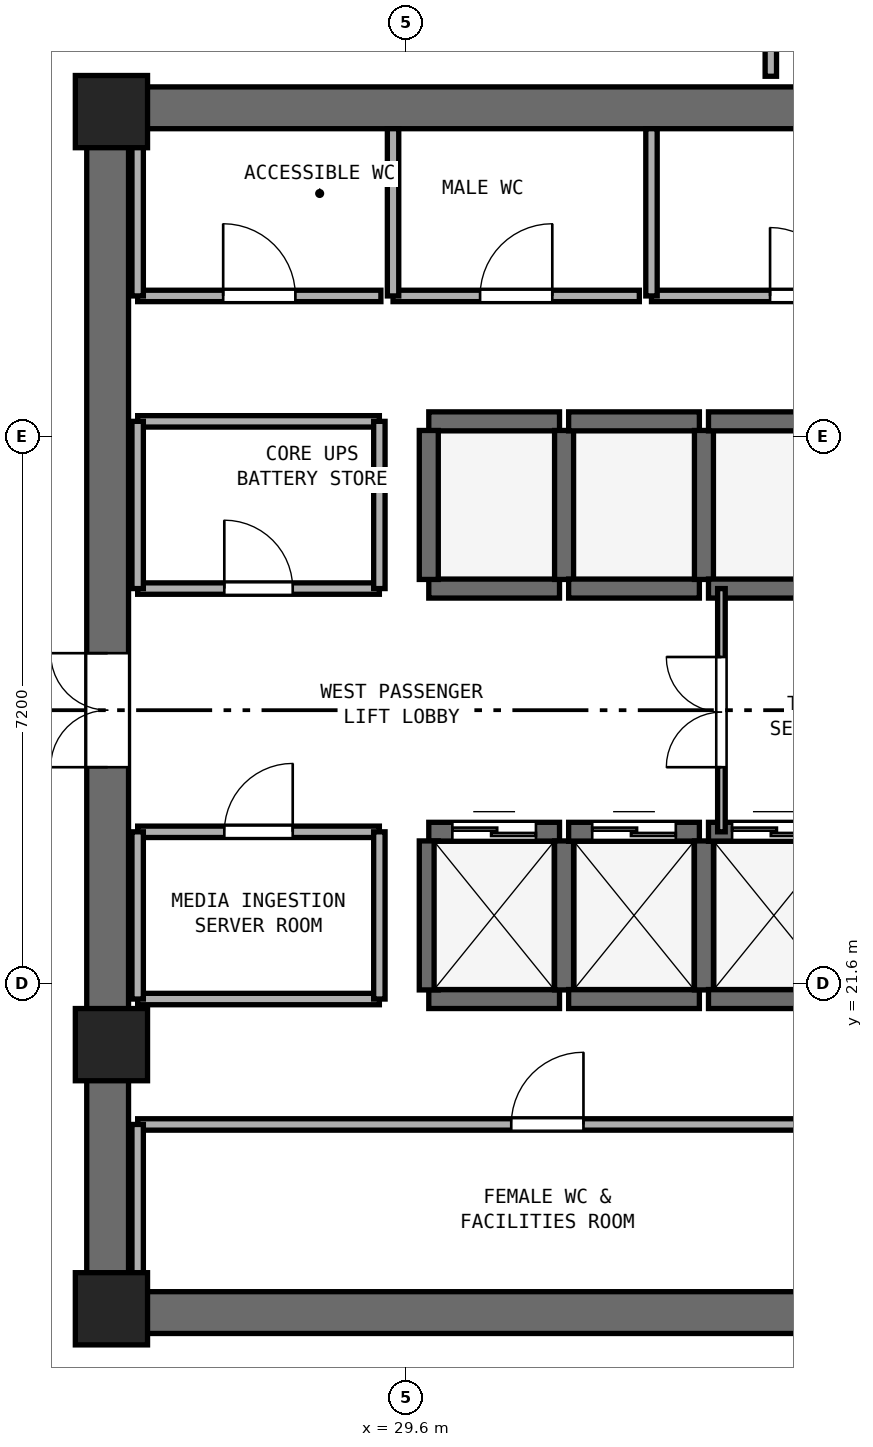
"""IFC4 building model, lengths in metres.
Left out: names, types, materials, properties, quantities, classifications, styles, units other than length and angle.
Written with IfcOpenShell. Run it as: python <this file> out.ifc"""

import sys

from ifc_helpers import new_model, si_unit, direction, frame, frame_2d, origin, origin_2d, place, context, subcontext, project, spatial, rectangle, extrude, element, fill, save


model = new_model("IFC4")
c1 = context("Model", 3, precision=1e-05, world=origin(), true_north=direction((0.0, 1.0)))
c2 = subcontext(c1, "Body", "Model", "MODEL_VIEW")
j1 = project(units=[si_unit("LENGTHUNIT", "METRE"), si_unit("PLANEANGLEUNIT", "RADIAN")], contexts=[c1])
p1 = place(None, origin())
s1 = spatial("IfcSite", under=j1, at=p1, CompositionType="ELEMENT")
p2 = place(p1, origin())
s2 = spatial("IfcBuilding", under=s1, at=p2, CompositionType="ELEMENT")
p3 = place(p2, frame((0.0, 0.0, 174.4)))
s3 = spatial("IfcBuildingStorey", under=s2, at=p3, CompositionType="ELEMENT", Elevation=174.4)
for number, where, z_axis, x_axis in (
    (1, (25.4, 17.275, 0.0), (0.0, 0.0, 1.0), (1.0, 0.0, 0.0)),
    (2, (25.4, 33.125, 0.0), (0.0, 0.0, 1.0), (1.0, 0.0, 0.0)),
):
    element("IfcWall", number, at=place(p3, frame(where, z_axis=z_axis, x_axis=x_axis)), inside=s3, PredefinedType="SHEAR", context=c2, shape_type="SweptSolid", body=[
        extrude(rectangle(XDim=23.2, YDim=0.55, at=frame_2d((11.6, 0.0))), origin(), (0.0, 0.0, 1.0), 3.54),
    ])
p4 = place(p3, frame((25.675, 17.55, 0.0), z_axis=(0.0, 0.0, 1.0), x_axis=(0.0, 1.0, 0.0)))
e3 = element("IfcWall", 3, at=p4, inside=s3, PredefinedType="SHEAR", context=c2, shape_type="SweptSolid", body=[
    extrude(rectangle(XDim=15.3, YDim=0.55, at=frame_2d((7.65, 0.0))), origin(), (0.0, 0.0, 1.0), 3.54),
])
p5 = place(p4, frame((6.9, 0.0, 0.0)))
e4 = element("IfcOpeningElement", 4, at=p5, cuts=e3, PredefinedType="OPENING", context=c2, shape_type="SweptSolid", body=[
    extrude(rectangle(XDim=1.5, YDim=2.15, at=frame_2d((0.75, 1.075))), frame((0.0, 0.285, 0.0), z_axis=(0.0, -1.0, 0.0), x_axis=(1.0, 0.0, 0.0)), (0.0, 0.0, 1.0), 0.57),
])
for number, where, z_axis, x_axis in (
    (5, (25.725, 17.325, 0.0), (0.0, 0.0, 1.0), (1.0, 0.0, 0.0)),
    (6, (25.725, 33.075, 0.0), (0.0, 0.0, 1.0), (1.0, 0.0, 0.0)),
    (7, (25.725, 20.8, 0.0), (0.0, 0.0, 1.0), (1.0, 0.0, 0.0)),
):
    element("IfcColumn", number, at=place(p3, frame(where, z_axis=z_axis, x_axis=x_axis)), inside=s3, PredefinedType="PILASTER", context=c2, shape_type="SweptSolid", body=[
        extrude(rectangle(XDim=0.95, YDim=0.95, at=origin_2d()), origin(), (0.0, 0.0, 1.0), 3.8),
    ])
p6 = place(p3, frame((29.9, 21.4, 0.0), z_axis=(0.0, 0.0, 1.0), x_axis=(1.0, 0.0, 0.0)))
e8 = element("IfcWall", 8, at=p6, inside=s3, PredefinedType="SHEAR", context=c2, shape_type="SweptSolid", body=[
    extrude(rectangle(XDim=1.72, YDim=0.25, at=frame_2d((0.86, 0.0))), origin(), (0.0, 0.0, 1.0), 3.54),
])
p7 = place(p3, frame((29.9, 23.6, 0.0), z_axis=(0.0, 0.0, 1.0), x_axis=(1.0, 0.0, 0.0)))
e9 = element("IfcWall", 9, at=p7, inside=s3, PredefinedType="SHEAR", context=c2, shape_type="SweptSolid", body=[
    extrude(rectangle(XDim=1.72, YDim=0.25, at=frame_2d((0.86, 0.0))), origin(), (0.0, 0.0, 1.0), 3.54),
])
p8 = place(p7, frame((0.31, 0.0, 0.0)))
e10 = element("IfcOpeningElement", 10, at=p8, cuts=e9, PredefinedType="OPENING", context=c2, shape_type="SweptSolid", body=[
    extrude(rectangle(XDim=1.1, YDim=2.15, at=frame_2d((0.55, 1.075))), frame((0.0, 0.135, 0.0), z_axis=(0.0, -1.0, 0.0), x_axis=(1.0, 0.0, 0.0)), (0.0, 0.0, 1.0), 0.27),
])
for number, where, z_axis, x_axis in (
    (11, (29.9, 21.52, 0.0), (0.0, 0.0, 1.0), (0.0, 1.0, 0.0)),
    (12, (31.68, 21.52, 0.0), (0.0, 0.0, 1.0), (0.0, 1.0, 0.0)),
):
    element("IfcWall", number, at=place(p3, frame(where, z_axis=z_axis, x_axis=x_axis)), inside=s3, PredefinedType="SHEAR", context=c2, shape_type="SweptSolid", body=[
        extrude(rectangle(XDim=1.96, YDim=0.25, at=frame_2d((0.98, 0.0))), origin(), (0.0, 0.0, 1.0), 3.54),
    ])
p9 = place(p3, frame((31.74, 21.4, 0.0), z_axis=(0.0, 0.0, 1.0), x_axis=(1.0, 0.0, 0.0)))
e13 = element("IfcWall", 13, at=p9, inside=s3, PredefinedType="SHEAR", context=c2, shape_type="SweptSolid", body=[
    extrude(rectangle(XDim=1.72, YDim=0.25, at=frame_2d((0.86, 0.0))), origin(), (0.0, 0.0, 1.0), 3.54),
])
p10 = place(p3, frame((31.74, 23.6, 0.0), z_axis=(0.0, 0.0, 1.0), x_axis=(1.0, 0.0, 0.0)))
e14 = element("IfcWall", 14, at=p10, inside=s3, PredefinedType="SHEAR", context=c2, shape_type="SweptSolid", body=[
    extrude(rectangle(XDim=1.72, YDim=0.25, at=frame_2d((0.86, 0.0))), origin(), (0.0, 0.0, 1.0), 3.54),
])
p11 = place(p10, frame((0.31, 0.0, 0.0)))
e15 = element("IfcOpeningElement", 15, at=p11, cuts=e14, PredefinedType="OPENING", context=c2, shape_type="SweptSolid", body=[
    extrude(rectangle(XDim=1.1, YDim=2.15, at=frame_2d((0.55, 1.075))), frame((0.0, 0.135, 0.0), z_axis=(0.0, -1.0, 0.0), x_axis=(1.0, 0.0, 0.0)), (0.0, 0.0, 1.0), 0.27),
])
p12 = place(p3, frame((33.52, 21.52, 0.0), z_axis=(0.0, 0.0, 1.0), x_axis=(0.0, 1.0, 0.0)))
e16 = element("IfcWall", 16, at=p12, inside=s3, PredefinedType="SHEAR", context=c2, shape_type="SweptSolid", body=[
    extrude(rectangle(XDim=1.96, YDim=0.25, at=frame_2d((0.98, 0.0))), origin(), (0.0, 0.0, 1.0), 3.54),
])
p13 = place(p3, frame((33.58, 21.4, 0.0), z_axis=(0.0, 0.0, 1.0), x_axis=(1.0, 0.0, 0.0)))
e17 = element("IfcWall", 17, at=p13, inside=s3, PredefinedType="SHEAR", context=c2, shape_type="SweptSolid", body=[
    extrude(rectangle(XDim=1.72, YDim=0.25, at=frame_2d((0.86, 0.0))), origin(), (0.0, 0.0, 1.0), 3.54),
])
p14 = place(p3, frame((33.58, 23.6, 0.0), z_axis=(0.0, 0.0, 1.0), x_axis=(1.0, 0.0, 0.0)))
e18 = element("IfcWall", 18, at=p14, inside=s3, PredefinedType="SHEAR", context=c2, shape_type="SweptSolid", body=[
    extrude(rectangle(XDim=1.72, YDim=0.25, at=frame_2d((0.86, 0.0))), origin(), (0.0, 0.0, 1.0), 3.54),
])
p15 = place(p14, frame((0.31, 0.0, 0.0)))
e19 = element("IfcOpeningElement", 19, at=p15, cuts=e18, PredefinedType="OPENING", context=c2, shape_type="SweptSolid", body=[
    extrude(rectangle(XDim=1.1, YDim=2.15, at=frame_2d((0.55, 1.075))), frame((0.0, 0.135, 0.0), z_axis=(0.0, -1.0, 0.0), x_axis=(1.0, 0.0, 0.0)), (0.0, 0.0, 1.0), 0.27),
])
for number, where, z_axis, x_axis in (
    (20, (29.9, 26.8, 0.0), (0.0, 0.0, 1.0), (1.0, 0.0, 0.0)),
    (21, (29.9, 29.0, 0.0), (0.0, 0.0, 1.0), (1.0, 0.0, 0.0)),
):
    element("IfcWall", number, at=place(p3, frame(where, z_axis=z_axis, x_axis=x_axis)), inside=s3, PredefinedType="SHEAR", context=c2, shape_type="SweptSolid", body=[
        extrude(rectangle(XDim=1.72, YDim=0.25, at=frame_2d((0.86, 0.0))), origin(), (0.0, 0.0, 1.0), 3.54),
    ])
for number, where, z_axis, x_axis in (
    (22, (29.9, 26.92, 0.0), (0.0, 0.0, 1.0), (0.0, 1.0, 0.0)),
    (23, (31.68, 26.92, 0.0), (0.0, 0.0, 1.0), (0.0, 1.0, 0.0)),
):
    element("IfcWall", number, at=place(p3, frame(where, z_axis=z_axis, x_axis=x_axis)), inside=s3, PredefinedType="SHEAR", context=c2, shape_type="SweptSolid", body=[
        extrude(rectangle(XDim=1.96, YDim=0.25, at=frame_2d((0.98, 0.0))), origin(), (0.0, 0.0, 1.0), 3.54),
    ])
for number, where, z_axis, x_axis in (
    (24, (31.74, 26.8, 0.0), (0.0, 0.0, 1.0), (1.0, 0.0, 0.0)),
    (25, (31.74, 29.0, 0.0), (0.0, 0.0, 1.0), (1.0, 0.0, 0.0)),
):
    element("IfcWall", number, at=place(p3, frame(where, z_axis=z_axis, x_axis=x_axis)), inside=s3, PredefinedType="SHEAR", context=c2, shape_type="SweptSolid", body=[
        extrude(rectangle(XDim=1.72, YDim=0.25, at=frame_2d((0.86, 0.0))), origin(), (0.0, 0.0, 1.0), 3.54),
    ])
p16 = place(p3, frame((33.52, 26.92, 0.0), z_axis=(0.0, 0.0, 1.0), x_axis=(0.0, 1.0, 0.0)))
e26 = element("IfcWall", 26, at=p16, inside=s3, PredefinedType="SHEAR", context=c2, shape_type="SweptSolid", body=[
    extrude(rectangle(XDim=1.96, YDim=0.25, at=frame_2d((0.98, 0.0))), origin(), (0.0, 0.0, 1.0), 3.54),
])
for number, where, z_axis, x_axis in (
    (27, (33.58, 26.8, 0.0), (0.0, 0.0, 1.0), (1.0, 0.0, 0.0)),
    (28, (33.58, 29.0, 0.0), (0.0, 0.0, 1.0), (1.0, 0.0, 0.0)),
):
    element("IfcWall", number, at=place(p3, frame(where, z_axis=z_axis, x_axis=x_axis)), inside=s3, PredefinedType="SHEAR", context=c2, shape_type="SweptSolid", body=[
        extrude(rectangle(XDim=1.72, YDim=0.25, at=frame_2d((0.86, 0.0))), origin(), (0.0, 0.0, 1.0), 3.54),
    ])
p17 = place(p3, frame((26.07, 30.65, 0.0), z_axis=(0.0, 0.0, 1.0), x_axis=(1.0, 0.0, 0.0)))
e29 = element("IfcWall", 29, at=p17, inside=s3, PredefinedType="PARTITIONING", context=c2, shape_type="SweptSolid", body=[
    extrude(rectangle(XDim=3.2, YDim=0.15, at=frame_2d((1.6, 0.0))), origin(), (0.0, 0.0, 1.0), 3.54),
])
p18 = place(p17, frame((1.125, 0.0, 0.0)))
e30 = element("IfcOpeningElement", 30, at=p18, cuts=e29, PredefinedType="OPENING", context=c2, shape_type="SweptSolid", body=[
    extrude(rectangle(XDim=0.95, YDim=2.1, at=frame_2d((0.475, 1.05))), frame((0.0, 0.085, 0.0), z_axis=(0.0, -1.0, 0.0), x_axis=(1.0, 0.0, 0.0)), (0.0, 0.0, 1.0), 0.17),
])
p19 = place(p3, frame((26.07, 30.65, 0.0), z_axis=(0.0, 0.0, 1.0), x_axis=(0.0, 1.0, 0.0)))
e31 = element("IfcWall", 31, at=p19, inside=s3, PredefinedType="PARTITIONING", context=c2, shape_type="SweptSolid", body=[
    extrude(rectangle(XDim=2.2, YDim=0.15, at=frame_2d((1.1, 0.0))), origin(), (0.0, 0.0, 1.0), 2.64),
])
p20 = place(p3, frame((29.43, 30.65, 0.0), z_axis=(0.0, 0.0, 1.0), x_axis=(1.0, 0.0, 0.0)))
e32 = element("IfcWall", 32, at=p20, inside=s3, PredefinedType="PARTITIONING", context=c2, shape_type="SweptSolid", body=[
    extrude(rectangle(XDim=3.24, YDim=0.15, at=frame_2d((1.62, 0.0))), origin(), (0.0, 0.0, 1.0), 3.54),
])
p21 = place(p20, frame((1.145, 0.0, 0.0)))
e33 = element("IfcOpeningElement", 33, at=p21, cuts=e32, PredefinedType="OPENING", context=c2, shape_type="SweptSolid", body=[
    extrude(rectangle(XDim=0.95, YDim=2.1, at=frame_2d((0.475, 1.05))), frame((0.0, 0.085, 0.0), z_axis=(0.0, -1.0, 0.0), x_axis=(1.0, 0.0, 0.0)), (0.0, 0.0, 1.0), 0.17),
])
p22 = place(p3, frame((29.43, 30.65, 0.0), z_axis=(0.0, 0.0, 1.0), x_axis=(0.0, 1.0, 0.0)))
e34 = element("IfcWall", 34, at=p22, inside=s3, PredefinedType="PARTITIONING", context=c2, shape_type="SweptSolid", body=[
    extrude(rectangle(XDim=2.2, YDim=0.15, at=frame_2d((1.1, 0.0))), origin(), (0.0, 0.0, 1.0), 3.54),
])
p23 = place(p3, frame((32.83, 30.65, 0.0), z_axis=(0.0, 0.0, 1.0), x_axis=(1.0, 0.0, 0.0)))
e35 = element("IfcWall", 35, at=p23, inside=s3, PredefinedType="PARTITIONING", context=c2, shape_type="SweptSolid", body=[
    extrude(rectangle(XDim=4.02, YDim=0.15, at=frame_2d((2.01, 0.0))), origin(), (0.0, 0.0, 1.0), 3.54),
])
p24 = place(p23, frame((1.56, 0.0, 0.0)))
e36 = element("IfcOpeningElement", 36, at=p24, cuts=e35, PredefinedType="OPENING", context=c2, shape_type="SweptSolid", body=[
    extrude(rectangle(XDim=0.9, YDim=2.1, at=frame_2d((0.45, 1.05))), frame((0.0, 0.085, 0.0), z_axis=(0.0, -1.0, 0.0), x_axis=(1.0, 0.0, 0.0)), (0.0, 0.0, 1.0), 0.17),
])
p25 = place(p3, frame((32.83, 30.65, 0.0), z_axis=(0.0, 0.0, 1.0), x_axis=(0.0, 1.0, 0.0)))
e37 = element("IfcWall", 37, at=p25, inside=s3, PredefinedType="PARTITIONING", context=c2, shape_type="SweptSolid", body=[
    extrude(rectangle(XDim=2.2, YDim=0.15, at=frame_2d((1.1, 0.0))), origin(), (0.0, 0.0, 1.0), 3.54),
])
p26 = place(p3, frame((26.07, 19.75, 0.0), z_axis=(0.0, 0.0, 1.0), x_axis=(1.0, 0.0, 0.0)))
e38 = element("IfcWall", 38, at=p26, inside=s3, PredefinedType="PARTITIONING", context=c2, shape_type="SweptSolid", body=[
    extrude(rectangle(XDim=10.78, YDim=0.15, at=frame_2d((5.39, 0.0))), origin(), (0.0, 0.0, 1.0), 3.54),
])
p27 = place(p26, frame((4.915, 0.0, 0.0)))
e39 = element("IfcOpeningElement", 39, at=p27, cuts=e38, PredefinedType="OPENING", context=c2, shape_type="SweptSolid", body=[
    extrude(rectangle(XDim=0.95, YDim=2.1, at=frame_2d((0.475, 1.05))), frame((0.0, 0.085, 0.0), z_axis=(0.0, -1.0, 0.0), x_axis=(1.0, 0.0, 0.0)), (0.0, 0.0, 1.0), 0.17),
])
p28 = place(p3, frame((26.07, 17.55, 0.0), z_axis=(0.0, 0.0, 1.0), x_axis=(0.0, 1.0, 0.0)))
e40 = element("IfcWall", 40, at=p28, inside=s3, PredefinedType="PARTITIONING", context=c2, shape_type="SweptSolid", body=[
    extrude(rectangle(XDim=2.2, YDim=0.15, at=frame_2d((1.1, 0.0))), origin(), (0.0, 0.0, 1.0), 2.64),
])
p29 = place(p3, frame((26.07, 26.8, 0.0), z_axis=(0.0, 0.0, 1.0), x_axis=(1.0, 0.0, 0.0)))
e41 = element("IfcWall", 41, at=p29, inside=s3, PredefinedType="PARTITIONING", context=c2, shape_type="SweptSolid", body=[
    extrude(rectangle(XDim=3.18, YDim=0.15, at=frame_2d((1.59, 0.0))), origin(), (0.0, 0.0, 1.0), 3.54),
])
p30 = place(p29, frame((1.14, 0.0, 0.0)))
e42 = element("IfcOpeningElement", 42, at=p30, cuts=e41, PredefinedType="OPENING", context=c2, shape_type="SweptSolid", body=[
    extrude(rectangle(XDim=0.9, YDim=2.1, at=frame_2d((0.45, 1.05))), frame((0.0, 0.085, 0.0), z_axis=(0.0, -1.0, 0.0), x_axis=(1.0, 0.0, 0.0)), (0.0, 0.0, 1.0), 0.17),
])
p31 = place(p3, frame((26.07, 29.0, 0.0), z_axis=(0.0, 0.0, 1.0), x_axis=(1.0, 0.0, 0.0)))
e43 = element("IfcWall", 43, at=p31, inside=s3, PredefinedType="PARTITIONING", context=c2, shape_type="SweptSolid", body=[
    extrude(rectangle(XDim=3.18, YDim=0.15, at=frame_2d((1.59, 0.0))), origin(), (0.0, 0.0, 1.0), 3.54),
])
p32 = place(p3, frame((26.07, 26.8, 0.0), z_axis=(0.0, 0.0, 1.0), x_axis=(0.0, 1.0, 0.0)))
e44 = element("IfcWall", 44, at=p32, inside=s3, PredefinedType="PARTITIONING", context=c2, shape_type="SweptSolid", body=[
    extrude(rectangle(XDim=2.2, YDim=0.15, at=frame_2d((1.1, 0.0))), origin(), (0.0, 0.0, 1.0), 2.64),
])
p33 = place(p3, frame((29.25, 26.8, 0.0), z_axis=(0.0, 0.0, 1.0), x_axis=(0.0, 1.0, 0.0)))
e45 = element("IfcWall", 45, at=p33, inside=s3, PredefinedType="PARTITIONING", context=c2, shape_type="SweptSolid", body=[
    extrude(rectangle(XDim=2.2, YDim=0.15, at=frame_2d((1.1, 0.0))), origin(), (0.0, 0.0, 1.0), 3.54),
])
p34 = place(p3, frame((26.07, 21.4, 0.0), z_axis=(0.0, 0.0, 1.0), x_axis=(1.0, 0.0, 0.0)))
e46 = element("IfcWall", 46, at=p34, inside=s3, PredefinedType="PARTITIONING", context=c2, shape_type="SweptSolid", body=[
    extrude(rectangle(XDim=3.18, YDim=0.15, at=frame_2d((1.59, 0.0))), origin(), (0.0, 0.0, 1.0), 3.54),
])
p35 = place(p3, frame((26.07, 23.6, 0.0), z_axis=(0.0, 0.0, 1.0), x_axis=(1.0, 0.0, 0.0)))
e47 = element("IfcWall", 47, at=p35, inside=s3, PredefinedType="PARTITIONING", context=c2, shape_type="SweptSolid", body=[
    extrude(rectangle(XDim=3.18, YDim=0.15, at=frame_2d((1.59, 0.0))), origin(), (0.0, 0.0, 1.0), 3.54),
])
p36 = place(p35, frame((1.14, 0.0, 0.0)))
e48 = element("IfcOpeningElement", 48, at=p36, cuts=e47, PredefinedType="OPENING", context=c2, shape_type="SweptSolid", body=[
    extrude(rectangle(XDim=0.9, YDim=2.1, at=frame_2d((0.45, 1.05))), frame((0.0, 0.085, 0.0), z_axis=(0.0, -1.0, 0.0), x_axis=(1.0, 0.0, 0.0)), (0.0, 0.0, 1.0), 0.17),
])
p37 = place(p3, frame((26.07, 21.4, 0.0), z_axis=(0.0, 0.0, 1.0), x_axis=(0.0, 1.0, 0.0)))
e49 = element("IfcWall", 49, at=p37, inside=s3, PredefinedType="PARTITIONING", context=c2, shape_type="SweptSolid", body=[
    extrude(rectangle(XDim=2.2, YDim=0.15, at=frame_2d((1.1, 0.0))), origin(), (0.0, 0.0, 1.0), 2.64),
])
p38 = place(p3, frame((29.25, 21.4, 0.0), z_axis=(0.0, 0.0, 1.0), x_axis=(0.0, 1.0, 0.0)))
e50 = element("IfcWall", 50, at=p38, inside=s3, PredefinedType="PARTITIONING", context=c2, shape_type="SweptSolid", body=[
    extrude(rectangle(XDim=2.2, YDim=0.15, at=frame_2d((1.1, 0.0))), origin(), (0.0, 0.0, 1.0), 3.54),
])
p39 = place(p3, frame((33.75, 23.6, 0.0), z_axis=(0.0, 0.0, 1.0), x_axis=(0.0, 1.0, 0.0)))
e51 = element("IfcWall", 51, at=p39, inside=s3, PredefinedType="PARTITIONING", context=c2, shape_type="SweptSolid", body=[
    extrude(rectangle(XDim=3.2, YDim=0.1, at=frame_2d((1.6, 0.0))), origin(), (0.0, 0.0, 1.0), 3.54),
])
p40 = place(p39, frame((0.85, 0.0, 0.0)))
e52 = element("IfcOpeningElement", 52, at=p40, cuts=e51, PredefinedType="OPENING", context=c2, shape_type="SweptSolid", body=[
    extrude(rectangle(XDim=1.45, YDim=2.12, at=frame_2d((0.725, 1.06))), frame((0.0, 0.06, 0.0), z_axis=(0.0, -1.0, 0.0), x_axis=(1.0, 0.0, 0.0)), (0.0, 0.0, 1.0), 0.12),
])
p41 = place(p3, frame((34.4, 33.54, 0.0), z_axis=(0.0, 0.0, 1.0), x_axis=(0.0, 1.0, 0.0)))
e53 = element("IfcWall", 53, at=p41, inside=s3, PredefinedType="PARTITIONING", context=c2, shape_type="SweptSolid", body=[
    extrude(rectangle(XDim=2.41, YDim=0.15, at=frame_2d((1.205, 0.0))), origin(), (0.0, 0.0, 1.0), 3.54),
])
p42 = place(p8, origin())
e54 = element("IfcDoor", 54, at=p42, inside=s3, OperationType="DOUBLE_DOOR_SLIDING", PredefinedType="DOOR", context=c2, shape_type="SweptSolid", body=[
    extrude(rectangle(XDim=1.1, YDim=2.15, at=frame_2d((0.55, 1.075))), frame((0.0, 0.025, 0.0), z_axis=(0.0, -1.0, 0.0), x_axis=(1.0, 0.0, 0.0)), (0.0, 0.0, 1.0), 0.05),
])
fill(e10, e54)
p43 = place(p11, origin())
e55 = element("IfcDoor", 55, at=p43, inside=s3, OperationType="DOUBLE_DOOR_SLIDING", PredefinedType="DOOR", context=c2, shape_type="SweptSolid", body=[
    extrude(rectangle(XDim=1.1, YDim=2.15, at=frame_2d((0.55, 1.075))), frame((0.0, 0.025, 0.0), z_axis=(0.0, -1.0, 0.0), x_axis=(1.0, 0.0, 0.0)), (0.0, 0.0, 1.0), 0.05),
])
fill(e15, e55)
p44 = place(p15, origin())
e56 = element("IfcDoor", 56, at=p44, inside=s3, OperationType="DOUBLE_DOOR_SLIDING", PredefinedType="DOOR", context=c2, shape_type="SweptSolid", body=[
    extrude(rectangle(XDim=1.1, YDim=2.15, at=frame_2d((0.55, 1.075))), frame((0.0, 0.025, 0.0), z_axis=(0.0, -1.0, 0.0), x_axis=(1.0, 0.0, 0.0)), (0.0, 0.0, 1.0), 0.05),
])
fill(e19, e56)
p45 = place(p5, origin())
e57 = element("IfcDoor", 57, at=p45, inside=s3, OperationType="DOUBLE_DOOR_SINGLE_SWING", PredefinedType="DOOR", context=c2, shape_type="SweptSolid", body=[
    extrude(rectangle(XDim=1.5, YDim=2.15, at=frame_2d((0.75, 1.075))), frame((0.0, 0.025, 0.0), z_axis=(0.0, -1.0, 0.0), x_axis=(1.0, 0.0, 0.0)), (0.0, 0.0, 1.0), 0.05),
])
fill(e4, e57)
p46 = place(p18, origin())
e58 = element("IfcDoor", 58, at=p46, inside=s3, OperationType="SINGLE_SWING_LEFT", PredefinedType="DOOR", context=c2, shape_type="SweptSolid", body=[
    extrude(rectangle(XDim=0.95, YDim=2.1, at=frame_2d((0.475, 1.05))), frame((0.0, 0.025, 0.0), z_axis=(0.0, -1.0, 0.0), x_axis=(1.0, 0.0, 0.0)), (0.0, 0.0, 1.0), 0.05),
])
fill(e30, e58)
p47 = place(p21, origin())
e59 = element("IfcDoor", 59, at=p47, inside=s3, OperationType="SINGLE_SWING_RIGHT", PredefinedType="DOOR", context=c2, shape_type="SweptSolid", body=[
    extrude(rectangle(XDim=0.95, YDim=2.1, at=frame_2d((0.475, 1.05))), frame((0.0, 0.025, 0.0), z_axis=(0.0, -1.0, 0.0), x_axis=(1.0, 0.0, 0.0)), (0.0, 0.0, 1.0), 0.05),
])
fill(e33, e59)
p48 = place(p24, origin())
e60 = element("IfcDoor", 60, at=p48, inside=s3, OperationType="SINGLE_SWING_LEFT", PredefinedType="DOOR", context=c2, shape_type="SweptSolid", body=[
    extrude(rectangle(XDim=0.9, YDim=2.1, at=frame_2d((0.45, 1.05))), frame((0.0, 0.025, 0.0), z_axis=(0.0, -1.0, 0.0), x_axis=(1.0, 0.0, 0.0)), (0.0, 0.0, 1.0), 0.05),
])
fill(e36, e60)
p49 = place(p27, origin())
e61 = element("IfcDoor", 61, at=p49, inside=s3, OperationType="SINGLE_SWING_RIGHT", PredefinedType="DOOR", context=c2, shape_type="SweptSolid", body=[
    extrude(rectangle(XDim=0.95, YDim=2.1, at=frame_2d((0.475, 1.05))), frame((0.0, 0.025, 0.0), z_axis=(0.0, -1.0, 0.0), x_axis=(1.0, 0.0, 0.0)), (0.0, 0.0, 1.0), 0.05),
])
fill(e39, e61)
p50 = place(p30, origin())
e62 = element("IfcDoor", 62, at=p50, inside=s3, OperationType="SINGLE_SWING_LEFT", PredefinedType="DOOR", context=c2, shape_type="SweptSolid", body=[
    extrude(rectangle(XDim=0.9, YDim=2.1, at=frame_2d((0.45, 1.05))), frame((0.0, 0.025, 0.0), z_axis=(0.0, -1.0, 0.0), x_axis=(1.0, 0.0, 0.0)), (0.0, 0.0, 1.0), 0.05),
])
fill(e42, e62)
p51 = place(p36, origin())
e63 = element("IfcDoor", 63, at=p51, inside=s3, OperationType="SINGLE_SWING_RIGHT", PredefinedType="DOOR", context=c2, shape_type="SweptSolid", body=[
    extrude(rectangle(XDim=0.9, YDim=2.1, at=frame_2d((0.45, 1.05))), frame((0.0, 0.025, 0.0), z_axis=(0.0, -1.0, 0.0), x_axis=(1.0, 0.0, 0.0)), (0.0, 0.0, 1.0), 0.05),
])
fill(e48, e63)
p52 = place(p40, origin())
e64 = element("IfcDoor", 64, at=p52, inside=s3, OperationType="DOUBLE_DOOR_SINGLE_SWING", PredefinedType="DOOR", context=c2, shape_type="SweptSolid", body=[
    extrude(rectangle(XDim=1.45, YDim=2.12, at=frame_2d((0.725, 1.06))), frame((0.0, 0.025, 0.0), z_axis=(0.0, -1.0, 0.0), x_axis=(1.0, 0.0, 0.0)), (0.0, 0.0, 1.0), 0.05),
])
fill(e52, e64)
save(model, sys.argv[1])
